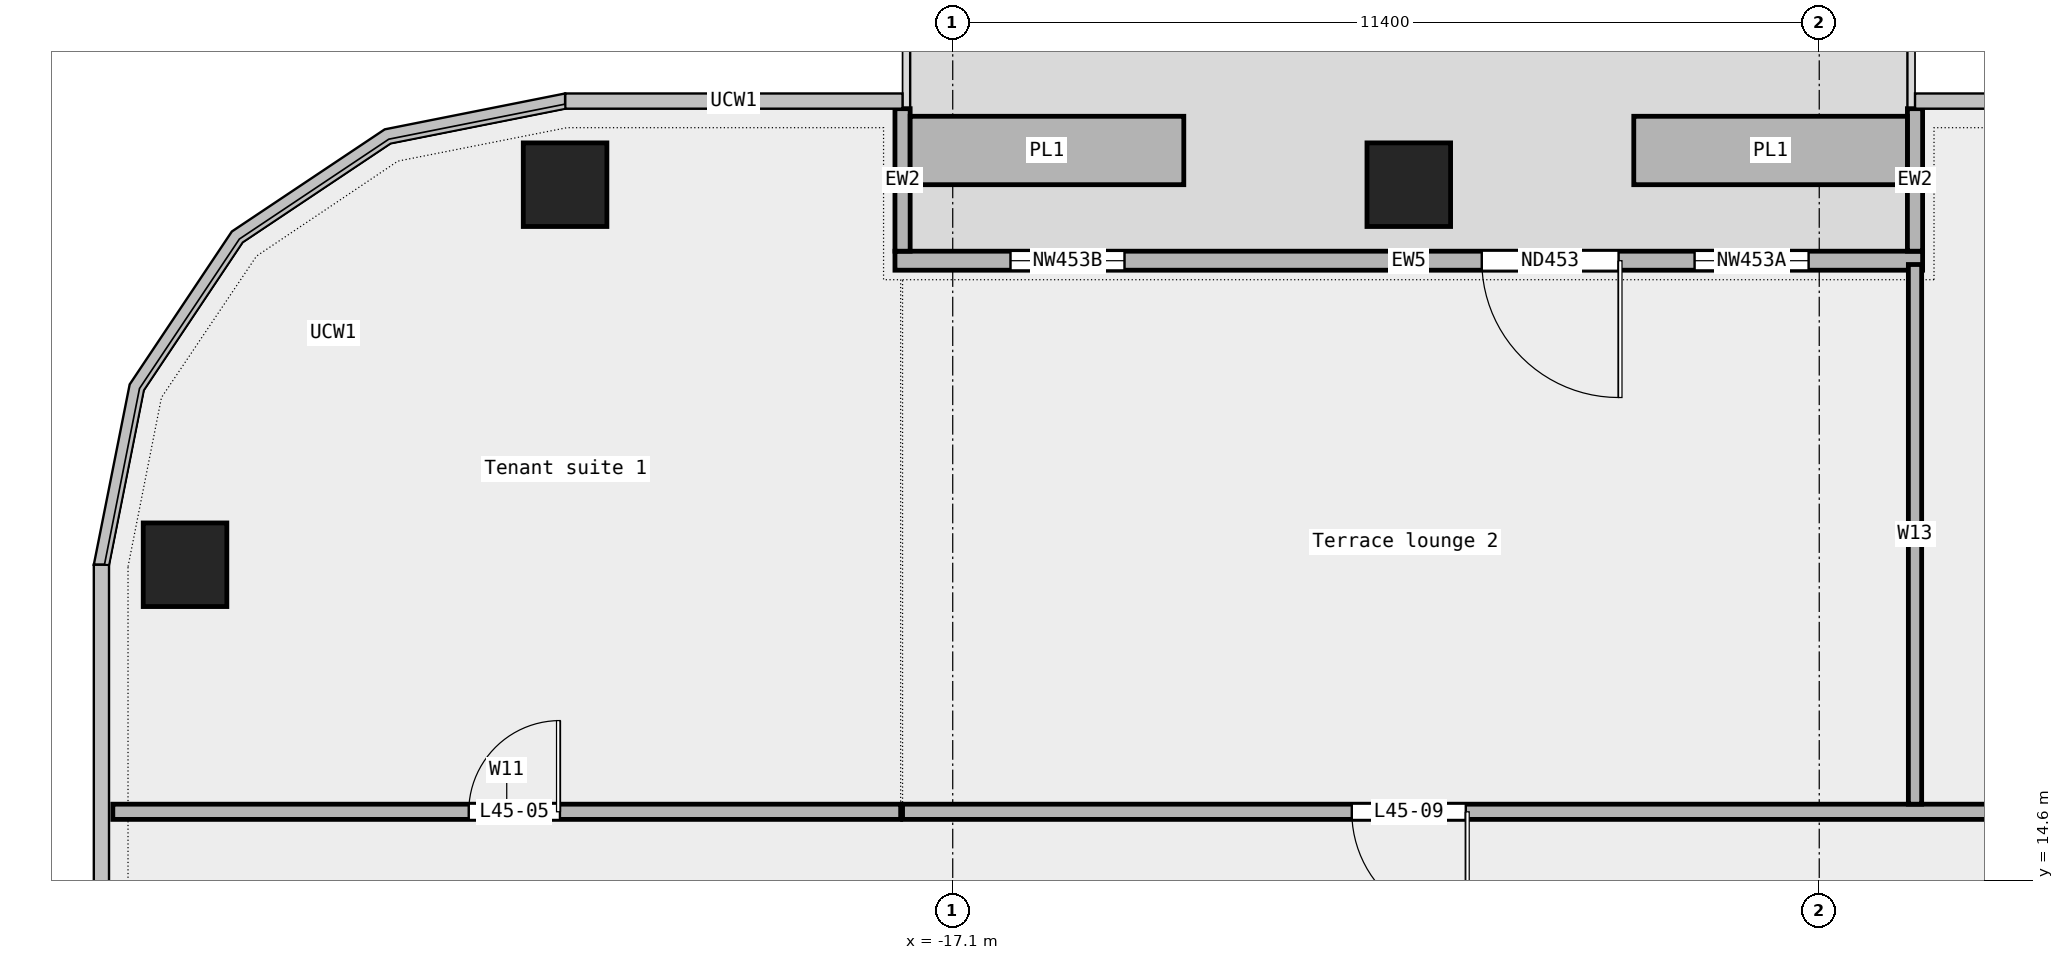
"""IFC4 building model, lengths in metres.
Left out: names, types, materials, properties, quantities, classifications, styles, units other than length and angle.
Written with IfcOpenShell. Run it as: python <this file> out.ifc"""

import sys

from ifc_helpers import new_model, si_unit, direction, frame, frame_2d, origin, origin_2d, place, context, subcontext, project, spatial, rectangle, extrude, element, fill, save


model = new_model("IFC4")
c1 = context("Model", 3, precision=1e-05, world=origin(), true_north=direction((0.0, 1.0)))
c2 = subcontext(c1, "Body", "Model", "MODEL_VIEW")
j1 = project(units=[si_unit("LENGTHUNIT", "METRE"), si_unit("PLANEANGLEUNIT", "RADIAN")], contexts=[c1])
p1 = place(None, origin())
s1 = spatial("IfcSite", under=j1, at=p1, CompositionType="ELEMENT")
p2 = place(p1, origin())
s2 = spatial("IfcBuilding", under=s1, at=p2, CompositionType="ELEMENT")
p3 = place(p2, frame((0.0, 0.0, 215.0)))
s3 = spatial("IfcBuildingStorey", under=s2, at=p3, CompositionType="ELEMENT", Elevation=215.0)
for number, where, z_axis, x_axis in (
    (1, (-11.1, 23.75, 0.0), (0.0, 0.0, 1.0), (1.0, 0.0, 0.0)),
    (2, (-22.2, 23.75, 0.0), (0.0, 0.0, 1.0), (1.0, 0.0, 0.0)),
    (3, (-27.2, 18.75, 0.0), (0.0, 0.0, 1.0), (1.0, 0.0, 0.0)),
):
    element("IfcColumn", number, at=place(p3, frame(where, z_axis=z_axis, x_axis=x_axis)), inside=s3, PredefinedType="COLUMN", context=c2, shape_type="SweptSolid", body=[
        extrude(rectangle(XDim=1.1, YDim=1.1, at=origin_2d()), origin(), (0.0, 0.0, 1.0), 3.6),
    ])
p4 = place(p3, frame((-4.34, 22.75, 0.0), z_axis=(0.0, 0.0, 1.0), x_axis=(-1.0, 0.0, 0.0)))
e4 = element("IfcWall", 4, at=p4, inside=s3, PredefinedType="STANDARD", context=c2, shape_type="SweptSolid", body=[
    extrude(rectangle(XDim=13.52, YDim=0.25, at=frame_2d((6.76, 0.0))), origin(), (0.0, 0.0, 1.0), 3.6),
])
p5 = place(p4, frame((1.5, 0.0, 0.45)))
e5 = element("IfcOpeningElement", 5, at=p5, cuts=e4, PredefinedType="OPENING", context=c2, shape_type="SweptSolid", body=[
    extrude(rectangle(XDim=1.5, YDim=2.4, at=frame_2d((0.75, 1.2))), frame((0.0, 0.137, 0.0), z_axis=(0.0, -1.0, 0.0), x_axis=(1.0, 0.0, 0.0)), (0.0, 0.0, 1.0), 0.274),
])
p6 = place(p4, frame((4.0, 0.0, 0.0)))
e6 = element("IfcOpeningElement", 6, at=p6, cuts=e4, PredefinedType="OPENING", context=c2, shape_type="SweptSolid", body=[
    extrude(rectangle(XDim=1.8, YDim=2.4, at=frame_2d((0.9, 1.2))), frame((0.0, 0.137, 0.0), z_axis=(0.0, -1.0, 0.0), x_axis=(1.0, 0.0, 0.0)), (0.0, 0.0, 1.0), 0.274),
])
p7 = place(p4, frame((10.5, 0.0, 0.45)))
e7 = element("IfcOpeningElement", 7, at=p7, cuts=e4, PredefinedType="OPENING", context=c2, shape_type="SweptSolid", body=[
    extrude(rectangle(XDim=1.5, YDim=2.4, at=frame_2d((0.75, 1.2))), frame((0.0, 0.137, 0.0), z_axis=(0.0, -1.0, 0.0), x_axis=(1.0, 0.0, 0.0)), (0.0, 0.0, 1.0), 0.274),
])
for number, where, z_axis, x_axis in (
    (8, (-4.44, 24.75, 0.0), (0.0, 0.0, 1.0), (0.0, -1.0, 0.0)),
    (9, (-17.76, 24.75, 0.0), (0.0, 0.0, 1.0), (0.0, -1.0, 0.0)),
):
    element("IfcWall", number, at=place(p3, frame(where, z_axis=z_axis, x_axis=x_axis)), inside=s3, PredefinedType="STANDARD", context=c2, shape_type="SweptSolid", body=[
        extrude(rectangle(XDim=1.875, YDim=0.2, at=frame_2d((0.938, 0.0))), origin(), (0.0, 0.0, 1.0), 3.6),
    ])
for number, where, z_axis, x_axis in (
    (10, (-4.54, 24.2, 0.0), (0.0, 0.0, 1.0), (-1.0, 0.0, 0.0)),
    (11, (-14.06, 24.2, 0.0), (0.0, 0.0, 1.0), (-1.0, 0.0, 0.0)),
):
    element("IfcWall", number, at=place(p3, frame(where, z_axis=z_axis, x_axis=x_axis)), inside=s3, PredefinedType="STANDARD", context=c2, shape_type="SweptSolid", body=[
        extrude(rectangle(XDim=3.6, YDim=0.9, at=frame_2d((1.8, 0.0))), origin(), (0.0, 0.0, 1.0), 0.7),
    ])
p8 = place(p3, frame((-28.15, 15.5, 0.0), z_axis=(0.0, 0.0, 1.0), x_axis=(1.0, 0.0, 0.0)))
e12 = element("IfcWall", 12, at=p8, inside=s3, PredefinedType="PARTITIONING", context=c2, shape_type="SweptSolid", body=[
    extrude(rectangle(XDim=10.365, YDim=0.2, at=frame_2d((5.183, 0.0))), origin(), (0.0, 0.0, 1.0), 3.6),
])
p9 = place(p8, frame((4.683, 0.0, 0.0)))
e13 = element("IfcOpeningElement", 13, at=p9, cuts=e12, PredefinedType="OPENING", context=c2, shape_type="SweptSolid", body=[
    extrude(rectangle(XDim=1.2, YDim=2.1, at=frame_2d((0.6, 1.05))), frame((0.0, 0.112, 0.0), z_axis=(0.0, -1.0, 0.0), x_axis=(1.0, 0.0, 0.0)), (0.0, 0.0, 1.0), 0.224),
])
p10 = place(p3, frame((-17.76, 15.5, 0.0), z_axis=(0.0, 0.0, 1.0), x_axis=(1.0, 0.0, 0.0)))
e14 = element("IfcWall", 14, at=p10, inside=s3, PredefinedType="PARTITIONING", context=c2, shape_type="SweptSolid", body=[
    extrude(rectangle(XDim=45.91, YDim=0.2, at=frame_2d((22.955, 0.0))), origin(), (0.0, 0.0, 1.0), 3.6),
])
p11 = place(p10, frame((37.337, 0.0, 0.0)))
e15 = element("IfcOpeningElement", 15, at=p11, cuts=e14, PredefinedType="OPENING", context=c2, shape_type="SweptSolid", body=[
    extrude(rectangle(XDim=1.5, YDim=2.1, at=frame_2d((0.75, 1.05))), frame((0.0, 0.112, 0.0), z_axis=(0.0, -1.0, 0.0), x_axis=(1.0, 0.0, 0.0)), (0.0, 0.0, 1.0), 0.224),
])
p12 = place(p10, frame((24.633, 0.0, 0.0)))
e16 = element("IfcOpeningElement", 16, at=p12, cuts=e14, PredefinedType="OPENING", context=c2, shape_type="SweptSolid", body=[
    extrude(rectangle(XDim=1.5, YDim=2.1, at=frame_2d((0.75, 1.05))), frame((0.0, 0.112, 0.0), z_axis=(0.0, -1.0, 0.0), x_axis=(1.0, 0.0, 0.0)), (0.0, 0.0, 1.0), 0.224),
])
p13 = place(p10, frame((5.91, 0.0, 0.0)))
e17 = element("IfcOpeningElement", 17, at=p13, cuts=e14, PredefinedType="OPENING", context=c2, shape_type="SweptSolid", body=[
    extrude(rectangle(XDim=1.5, YDim=2.1, at=frame_2d((0.75, 1.05))), frame((0.0, 0.112, 0.0), z_axis=(0.0, -1.0, 0.0), x_axis=(1.0, 0.0, 0.0)), (0.0, 0.0, 1.0), 0.224),
])
p14 = place(p10, frame((16.21, 0.0, 0.0)))
e18 = element("IfcOpeningElement", 18, at=p14, cuts=e14, PredefinedType="OPENING", context=c2, shape_type="SweptSolid", body=[
    extrude(rectangle(XDim=1.2, YDim=2.1, at=frame_2d((0.6, 1.05))), frame((0.0, 0.112, 0.0), z_axis=(0.0, -1.0, 0.0), x_axis=(1.0, 0.0, 0.0)), (0.0, 0.0, 1.0), 0.224),
])
p15 = place(p3, frame((-4.44, 15.6, 0.0), z_axis=(0.0, 0.0, 1.0), x_axis=(0.0, 1.0, 0.0)))
e19 = element("IfcWall", 19, at=p15, inside=s3, PredefinedType="PARTITIONING", context=c2, shape_type="SweptSolid", body=[
    extrude(rectangle(XDim=7.1, YDim=0.175, at=frame_2d((3.55, 0.0))), origin(), (0.0, 0.0, 1.0), 3.6),
])
p16 = place(p5, origin())
e20 = element("IfcWindow", 20, at=p16, inside=s3, PartitioningType="SINGLE_PANEL", PredefinedType="WINDOW", context=c2, shape_type="SweptSolid", body=[
    extrude(rectangle(XDim=1.5, YDim=2.4, at=frame_2d((0.75, 1.2))), frame((0.0, 0.03, 0.0), z_axis=(0.0, -1.0, 0.0), x_axis=(1.0, 0.0, 0.0)), (0.0, 0.0, 1.0), 0.06),
])
fill(e5, e20)
p17 = place(p6, origin())
e21 = element("IfcDoor", 21, at=p17, inside=s3, OperationType="DOUBLE_DOOR_SINGLE_SWING", PredefinedType="DOOR", context=c2, shape_type="SweptSolid", body=[
    extrude(rectangle(XDim=1.8, YDim=2.4, at=frame_2d((0.9, 1.2))), frame((0.0, 0.025, 0.0), z_axis=(0.0, -1.0, 0.0), x_axis=(1.0, 0.0, 0.0)), (0.0, 0.0, 1.0), 0.05),
])
fill(e6, e21)
p18 = place(p7, origin())
e22 = element("IfcWindow", 22, at=p18, inside=s3, PartitioningType="SINGLE_PANEL", PredefinedType="WINDOW", context=c2, shape_type="SweptSolid", body=[
    extrude(rectangle(XDim=1.5, YDim=2.4, at=frame_2d((0.75, 1.2))), frame((0.0, 0.03, 0.0), z_axis=(0.0, -1.0, 0.0), x_axis=(1.0, 0.0, 0.0)), (0.0, 0.0, 1.0), 0.06),
])
fill(e7, e22)
p19 = place(p9, origin())
e23 = element("IfcDoor", 23, at=p19, inside=s3, OperationType="SINGLE_SWING_RIGHT", PredefinedType="DOOR", context=c2, shape_type="SweptSolid", body=[
    extrude(rectangle(XDim=1.2, YDim=2.1, at=frame_2d((0.6, 1.05))), frame((0.0, 0.025, 0.0), z_axis=(0.0, -1.0, 0.0), x_axis=(1.0, 0.0, 0.0)), (0.0, 0.0, 1.0), 0.05),
])
fill(e13, e23)
p20 = place(p13, origin())
e24 = element("IfcDoor", 24, at=p20, inside=s3, OperationType="DOUBLE_DOOR_SINGLE_SWING", PredefinedType="DOOR", context=c2, shape_type="SweptSolid", body=[
    extrude(rectangle(XDim=1.5, YDim=2.1, at=frame_2d((0.75, 1.05))), frame((0.0, 0.025, 0.0), z_axis=(0.0, -1.0, 0.0), x_axis=(1.0, 0.0, 0.0)), (0.0, 0.0, 1.0), 0.05),
])
fill(e17, e24)
save(model, sys.argv[1])
